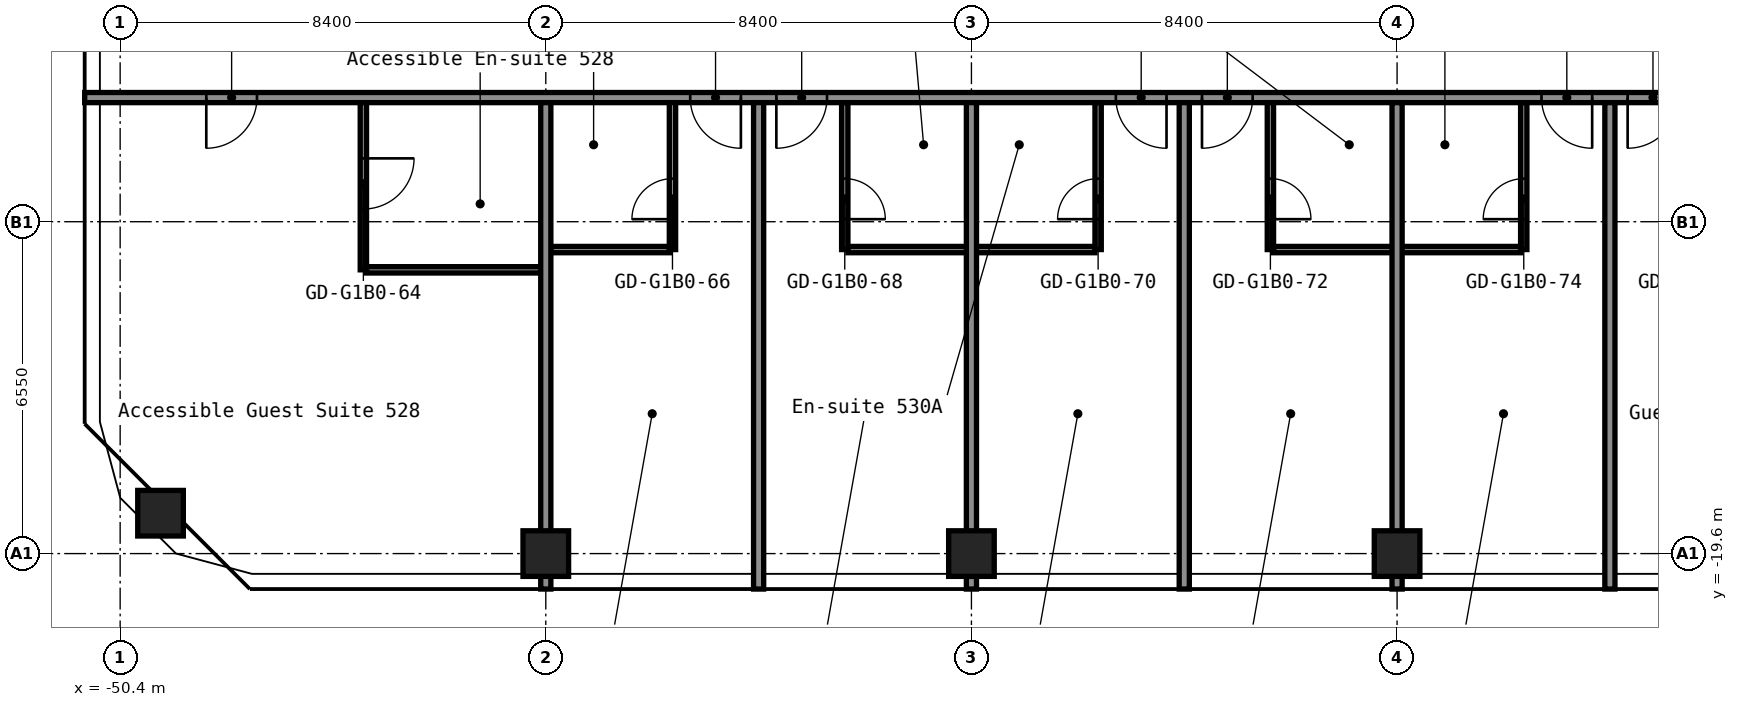
"""IFC4 building model, lengths in metres.
Left out: names, types, materials, properties, quantities, classifications, styles, units other than length and angle.
Written with IfcOpenShell. Run it as: python <this file> out.ifc"""

import sys

from ifc_helpers import new_model, si_unit, direction, frame, frame_2d, origin, origin_2d, place, context, subcontext, project, spatial, rectangle, hollow_rectangle, extrude, element, fill, save


model = new_model("IFC4")
c1 = context("Model", 3, precision=1e-05, world=origin(), true_north=direction((0.0, 1.0)))
c2 = subcontext(c1, "Body", "Model", "MODEL_VIEW")
j1 = project(units=[si_unit("LENGTHUNIT", "METRE"), si_unit("PLANEANGLEUNIT", "RADIAN")], contexts=[c1])
p1 = place(None, origin())
s1 = spatial("IfcSite", under=j1, at=p1, CompositionType="ELEMENT")
p2 = place(p1, origin())
s2 = spatial("IfcBuilding", under=s1, at=p2, CompositionType="ELEMENT")
p3 = place(p2, frame((0.0, 0.0, 23.0)))
s3 = spatial("IfcBuildingStorey", under=s2, at=p3, CompositionType="ELEMENT", Elevation=23.0)
for number, where, z_axis, x_axis in (
    (1, (-49.603, -18.803, 0.0), (0.0, 0.0, 1.0), (1.0, 0.0, 0.0)),
    (2, (-42.0, -19.6, 0.0), (0.0, 0.0, 1.0), (1.0, 0.0, 0.0)),
    (3, (-33.6, -19.6, 0.0), (0.0, 0.0, 1.0), (1.0, 0.0, 0.0)),
    (4, (-25.2, -19.6, 0.0), (0.0, 0.0, 1.0), (1.0, 0.0, 0.0)),
):
    element("IfcColumn", number, at=place(p3, frame(where, z_axis=z_axis, x_axis=x_axis)), inside=s3, PredefinedType="COLUMN", context=c2, shape_type="SweptSolid", body=[
        extrude(hollow_rectangle(XDim=0.9, YDim=0.9, WallThickness=0.036, at=origin_2d()), origin(), (0.0, 0.0, 1.0), 2.8),
    ])
p4 = place(p3, frame((-45.538, -14.0, 0.0), z_axis=(0.0, 0.0, 1.0), x_axis=(1.0, 0.0, 0.0)))
e5 = element("IfcWall", 5, at=p4, inside=s3, PredefinedType="PARTITIONING", context=c2, shape_type="SweptSolid", body=[
    extrude(rectangle(XDim=3.438, YDim=0.125, at=frame_2d((1.719, 0.0))), origin(), (0.0, 0.0, 1.0), 2.8),
])
p5 = place(p3, frame((-41.9, -13.6, 0.0), z_axis=(0.0, 0.0, 1.0), x_axis=(1.0, 0.0, 0.0)))
e6 = element("IfcWall", 6, at=p5, inside=s3, PredefinedType="PARTITIONING", context=c2, shape_type="SweptSolid", body=[
    extrude(rectangle(XDim=2.337, YDim=0.125, at=frame_2d((1.169, 0.0))), origin(), (0.0, 0.0, 1.0), 2.8),
])
for number, where, z_axis, x_axis in (
    (7, (-36.038, -13.6, 0.0), (0.0, 0.0, 1.0), (1.0, 0.0, 0.0)),
    (8, (-27.637, -13.6, 0.0), (0.0, 0.0, 1.0), (1.0, 0.0, 0.0)),
):
    element("IfcWall", number, at=place(p3, frame(where, z_axis=z_axis, x_axis=x_axis)), inside=s3, PredefinedType="PARTITIONING", context=c2, shape_type="SweptSolid", body=[
        extrude(rectangle(XDim=4.875, YDim=0.125, at=frame_2d((2.438, 0.0))), origin(), (0.0, 0.0, 1.0), 2.8),
    ])
p6 = place(p3, frame((-51.1, -10.6, 0.0), z_axis=(0.0, 0.0, 1.0), x_axis=(1.0, 0.0, 0.0)))
e9 = element("IfcWall", 9, at=p6, inside=s3, PredefinedType="PARTITIONING", context=c2, shape_type="SweptSolid", body=[
    extrude(rectangle(XDim=34.3, YDim=0.2, at=frame_2d((17.15, 0.0))), origin(), (0.0, 0.0, 1.0), 2.8),
])
p7 = place(p6, frame((2.4, 0.0, 0.0)))
e10 = element("IfcOpeningElement", 10, at=p7, cuts=e9, PredefinedType="OPENING", context=c2, shape_type="SweptSolid", body=[
    extrude(rectangle(XDim=1.0, YDim=2.1, at=frame_2d((0.5, 1.05))), frame((0.0, 0.11, 0.0), z_axis=(0.0, -1.0, 0.0), x_axis=(1.0, 0.0, 0.0)), (0.0, 0.0, 1.0), 0.22),
])
p8 = place(p6, frame((11.95, 0.0, 0.0)))
e11 = element("IfcOpeningElement", 11, at=p8, cuts=e9, PredefinedType="OPENING", context=c2, shape_type="SweptSolid", body=[
    extrude(rectangle(XDim=1.0, YDim=2.1, at=frame_2d((0.5, 1.05))), frame((0.0, 0.11, 0.0), z_axis=(0.0, -1.0, 0.0), x_axis=(1.0, 0.0, 0.0)), (0.0, 0.0, 1.0), 0.22),
])
p9 = place(p6, frame((13.65, 0.0, 0.0)))
e12 = element("IfcOpeningElement", 12, at=p9, cuts=e9, PredefinedType="OPENING", context=c2, shape_type="SweptSolid", body=[
    extrude(rectangle(XDim=1.0, YDim=2.1, at=frame_2d((0.5, 1.05))), frame((0.0, 0.11, 0.0), z_axis=(0.0, -1.0, 0.0), x_axis=(1.0, 0.0, 0.0)), (0.0, 0.0, 1.0), 0.22),
])
p10 = place(p6, frame((20.35, 0.0, 0.0)))
e13 = element("IfcOpeningElement", 13, at=p10, cuts=e9, PredefinedType="OPENING", context=c2, shape_type="SweptSolid", body=[
    extrude(rectangle(XDim=1.0, YDim=2.1, at=frame_2d((0.5, 1.05))), frame((0.0, 0.11, 0.0), z_axis=(0.0, -1.0, 0.0), x_axis=(1.0, 0.0, 0.0)), (0.0, 0.0, 1.0), 0.22),
])
p11 = place(p6, frame((22.05, 0.0, 0.0)))
e14 = element("IfcOpeningElement", 14, at=p11, cuts=e9, PredefinedType="OPENING", context=c2, shape_type="SweptSolid", body=[
    extrude(rectangle(XDim=1.0, YDim=2.1, at=frame_2d((0.5, 1.05))), frame((0.0, 0.11, 0.0), z_axis=(0.0, -1.0, 0.0), x_axis=(1.0, 0.0, 0.0)), (0.0, 0.0, 1.0), 0.22),
])
p12 = place(p6, frame((28.75, 0.0, 0.0)))
e15 = element("IfcOpeningElement", 15, at=p12, cuts=e9, PredefinedType="OPENING", context=c2, shape_type="SweptSolid", body=[
    extrude(rectangle(XDim=1.0, YDim=2.1, at=frame_2d((0.5, 1.05))), frame((0.0, 0.11, 0.0), z_axis=(0.0, -1.0, 0.0), x_axis=(1.0, 0.0, 0.0)), (0.0, 0.0, 1.0), 0.22),
])
p13 = place(p6, frame((30.45, 0.0, 0.0)))
e16 = element("IfcOpeningElement", 16, at=p13, cuts=e9, PredefinedType="OPENING", context=c2, shape_type="SweptSolid", body=[
    extrude(rectangle(XDim=1.0, YDim=2.1, at=frame_2d((0.5, 1.05))), frame((0.0, 0.11, 0.0), z_axis=(0.0, -1.0, 0.0), x_axis=(1.0, 0.0, 0.0)), (0.0, 0.0, 1.0), 0.22),
])
p14 = place(p3, frame((-45.6, -14.0, 0.0), z_axis=(0.0, 0.0, 1.0), x_axis=(0.0, 1.0, 0.0)))
e17 = element("IfcWall", 17, at=p14, inside=s3, PredefinedType="PARTITIONING", context=c2, shape_type="SweptSolid", body=[
    extrude(rectangle(XDim=3.3, YDim=0.125, at=frame_2d((1.65, 0.0))), origin(), (0.0, 0.0, 1.0), 2.8),
])
p15 = place(p14, frame((1.2, 0.0, 0.0)))
e18 = element("IfcOpeningElement", 18, at=p15, cuts=e17, PredefinedType="OPENING", context=c2, shape_type="SweptSolid", body=[
    extrude(rectangle(XDim=1.0, YDim=2.1, at=frame_2d((0.5, 1.05))), frame((0.0, 0.073, 0.0), z_axis=(0.0, -1.0, 0.0), x_axis=(1.0, 0.0, 0.0)), (0.0, 0.0, 1.0), 0.145),
])
p16 = place(p3, frame((-42.0, -20.3, 0.0), z_axis=(0.0, 0.0, 1.0), x_axis=(0.0, 1.0, 0.0)))
e19 = element("IfcWall", 19, at=p16, inside=s3, PredefinedType="PARTITIONING", context=c2, shape_type="SweptSolid", body=[
    extrude(rectangle(XDim=9.6, YDim=0.2, at=frame_2d((4.8, 0.0))), origin(), (0.0, 0.0, 1.0), 2.8),
])
p17 = place(p3, frame((-39.5, -13.6, 0.0), z_axis=(0.0, 0.0, 1.0), x_axis=(0.0, 1.0, 0.0)))
e20 = element("IfcWall", 20, at=p17, inside=s3, PredefinedType="PARTITIONING", context=c2, shape_type="SweptSolid", body=[
    extrude(rectangle(XDim=2.9, YDim=0.125, at=frame_2d((1.45, 0.0))), origin(), (0.0, 0.0, 1.0), 2.8),
])
p18 = place(p17, frame((0.6, 0.0, 0.0)))
e21 = element("IfcOpeningElement", 21, at=p18, cuts=e20, PredefinedType="OPENING", context=c2, shape_type="SweptSolid", body=[
    extrude(rectangle(XDim=0.8, YDim=2.1, at=frame_2d((0.4, 1.05))), frame((0.0, 0.073, 0.0), z_axis=(0.0, -1.0, 0.0), x_axis=(1.0, 0.0, 0.0)), (0.0, 0.0, 1.0), 0.145),
])
p19 = place(p3, frame((-37.8, -20.3, 0.0), z_axis=(0.0, 0.0, 1.0), x_axis=(0.0, 1.0, 0.0)))
e22 = element("IfcWall", 22, at=p19, inside=s3, PredefinedType="PARTITIONING", context=c2, shape_type="SweptSolid", body=[
    extrude(rectangle(XDim=9.6, YDim=0.2, at=frame_2d((4.8, 0.0))), origin(), (0.0, 0.0, 1.0), 2.8),
])
p20 = place(p3, frame((-36.1, -13.6, 0.0), z_axis=(0.0, 0.0, 1.0), x_axis=(0.0, 1.0, 0.0)))
e23 = element("IfcWall", 23, at=p20, inside=s3, PredefinedType="PARTITIONING", context=c2, shape_type="SweptSolid", body=[
    extrude(rectangle(XDim=2.9, YDim=0.125, at=frame_2d((1.45, 0.0))), origin(), (0.0, 0.0, 1.0), 2.8),
])
p21 = place(p20, frame((0.6, 0.0, 0.0)))
e24 = element("IfcOpeningElement", 24, at=p21, cuts=e23, PredefinedType="OPENING", context=c2, shape_type="SweptSolid", body=[
    extrude(rectangle(XDim=0.8, YDim=2.1, at=frame_2d((0.4, 1.05))), frame((0.0, 0.073, 0.0), z_axis=(0.0, -1.0, 0.0), x_axis=(1.0, 0.0, 0.0)), (0.0, 0.0, 1.0), 0.145),
])
p22 = place(p3, frame((-33.6, -20.3, 0.0), z_axis=(0.0, 0.0, 1.0), x_axis=(0.0, 1.0, 0.0)))
e25 = element("IfcWall", 25, at=p22, inside=s3, PredefinedType="PARTITIONING", context=c2, shape_type="SweptSolid", body=[
    extrude(rectangle(XDim=9.6, YDim=0.2, at=frame_2d((4.8, 0.0))), origin(), (0.0, 0.0, 1.0), 2.8),
])
p23 = place(p3, frame((-31.1, -13.6, 0.0), z_axis=(0.0, 0.0, 1.0), x_axis=(0.0, 1.0, 0.0)))
e26 = element("IfcWall", 26, at=p23, inside=s3, PredefinedType="PARTITIONING", context=c2, shape_type="SweptSolid", body=[
    extrude(rectangle(XDim=2.9, YDim=0.125, at=frame_2d((1.45, 0.0))), origin(), (0.0, 0.0, 1.0), 2.8),
])
p24 = place(p23, frame((0.6, 0.0, 0.0)))
e27 = element("IfcOpeningElement", 27, at=p24, cuts=e26, PredefinedType="OPENING", context=c2, shape_type="SweptSolid", body=[
    extrude(rectangle(XDim=0.8, YDim=2.1, at=frame_2d((0.4, 1.05))), frame((0.0, 0.073, 0.0), z_axis=(0.0, -1.0, 0.0), x_axis=(1.0, 0.0, 0.0)), (0.0, 0.0, 1.0), 0.145),
])
p25 = place(p3, frame((-29.4, -20.3, 0.0), z_axis=(0.0, 0.0, 1.0), x_axis=(0.0, 1.0, 0.0)))
e28 = element("IfcWall", 28, at=p25, inside=s3, PredefinedType="PARTITIONING", context=c2, shape_type="SweptSolid", body=[
    extrude(rectangle(XDim=9.6, YDim=0.2, at=frame_2d((4.8, 0.0))), origin(), (0.0, 0.0, 1.0), 2.8),
])
p26 = place(p3, frame((-27.7, -13.6, 0.0), z_axis=(0.0, 0.0, 1.0), x_axis=(0.0, 1.0, 0.0)))
e29 = element("IfcWall", 29, at=p26, inside=s3, PredefinedType="PARTITIONING", context=c2, shape_type="SweptSolid", body=[
    extrude(rectangle(XDim=2.9, YDim=0.125, at=frame_2d((1.45, 0.0))), origin(), (0.0, 0.0, 1.0), 2.8),
])
p27 = place(p26, frame((0.6, 0.0, 0.0)))
e30 = element("IfcOpeningElement", 30, at=p27, cuts=e29, PredefinedType="OPENING", context=c2, shape_type="SweptSolid", body=[
    extrude(rectangle(XDim=0.8, YDim=2.1, at=frame_2d((0.4, 1.05))), frame((0.0, 0.073, 0.0), z_axis=(0.0, -1.0, 0.0), x_axis=(1.0, 0.0, 0.0)), (0.0, 0.0, 1.0), 0.145),
])
p28 = place(p3, frame((-25.2, -20.3, 0.0), z_axis=(0.0, 0.0, 1.0), x_axis=(0.0, 1.0, 0.0)))
e31 = element("IfcWall", 31, at=p28, inside=s3, PredefinedType="PARTITIONING", context=c2, shape_type="SweptSolid", body=[
    extrude(rectangle(XDim=9.6, YDim=0.2, at=frame_2d((4.8, 0.0))), origin(), (0.0, 0.0, 1.0), 2.8),
])
p29 = place(p3, frame((-22.7, -13.6, 0.0), z_axis=(0.0, 0.0, 1.0), x_axis=(0.0, 1.0, 0.0)))
e32 = element("IfcWall", 32, at=p29, inside=s3, PredefinedType="PARTITIONING", context=c2, shape_type="SweptSolid", body=[
    extrude(rectangle(XDim=2.9, YDim=0.125, at=frame_2d((1.45, 0.0))), origin(), (0.0, 0.0, 1.0), 2.8),
])
p30 = place(p29, frame((0.6, 0.0, 0.0)))
e33 = element("IfcOpeningElement", 33, at=p30, cuts=e32, PredefinedType="OPENING", context=c2, shape_type="SweptSolid", body=[
    extrude(rectangle(XDim=0.8, YDim=2.1, at=frame_2d((0.4, 1.05))), frame((0.0, 0.073, 0.0), z_axis=(0.0, -1.0, 0.0), x_axis=(1.0, 0.0, 0.0)), (0.0, 0.0, 1.0), 0.145),
])
p31 = place(p3, frame((-21.0, -20.3, 0.0), z_axis=(0.0, 0.0, 1.0), x_axis=(0.0, 1.0, 0.0)))
e34 = element("IfcWall", 34, at=p31, inside=s3, PredefinedType="PARTITIONING", context=c2, shape_type="SweptSolid", body=[
    extrude(rectangle(XDim=9.6, YDim=0.2, at=frame_2d((4.8, 0.0))), origin(), (0.0, 0.0, 1.0), 2.8),
])
p32 = place(p7, origin())
e35 = element("IfcDoor", 35, at=p32, inside=s3, OperationType="SINGLE_SWING_LEFT", PredefinedType="DOOR", context=c2, shape_type="SweptSolid", body=[
    extrude(rectangle(XDim=1.0, YDim=2.1, at=frame_2d((0.5, 1.05))), frame((0.0, 0.025, 0.0), z_axis=(0.0, -1.0, 0.0), x_axis=(1.0, 0.0, 0.0)), (0.0, 0.0, 1.0), 0.05),
])
fill(e10, e35)
p33 = place(p8, origin())
e36 = element("IfcDoor", 36, at=p33, inside=s3, OperationType="SINGLE_SWING_RIGHT", PredefinedType="DOOR", context=c2, shape_type="SweptSolid", body=[
    extrude(rectangle(XDim=1.0, YDim=2.1, at=frame_2d((0.5, 1.05))), frame((0.0, 0.025, 0.0), z_axis=(0.0, -1.0, 0.0), x_axis=(1.0, 0.0, 0.0)), (0.0, 0.0, 1.0), 0.05),
])
fill(e11, e36)
p34 = place(p9, origin())
e37 = element("IfcDoor", 37, at=p34, inside=s3, OperationType="SINGLE_SWING_LEFT", PredefinedType="DOOR", context=c2, shape_type="SweptSolid", body=[
    extrude(rectangle(XDim=1.0, YDim=2.1, at=frame_2d((0.5, 1.05))), frame((0.0, 0.025, 0.0), z_axis=(0.0, -1.0, 0.0), x_axis=(1.0, 0.0, 0.0)), (0.0, 0.0, 1.0), 0.05),
])
fill(e12, e37)
p35 = place(p10, origin())
e38 = element("IfcDoor", 38, at=p35, inside=s3, OperationType="SINGLE_SWING_RIGHT", PredefinedType="DOOR", context=c2, shape_type="SweptSolid", body=[
    extrude(rectangle(XDim=1.0, YDim=2.1, at=frame_2d((0.5, 1.05))), frame((0.0, 0.025, 0.0), z_axis=(0.0, -1.0, 0.0), x_axis=(1.0, 0.0, 0.0)), (0.0, 0.0, 1.0), 0.05),
])
fill(e13, e38)
p36 = place(p11, origin())
e39 = element("IfcDoor", 39, at=p36, inside=s3, OperationType="SINGLE_SWING_LEFT", PredefinedType="DOOR", context=c2, shape_type="SweptSolid", body=[
    extrude(rectangle(XDim=1.0, YDim=2.1, at=frame_2d((0.5, 1.05))), frame((0.0, 0.025, 0.0), z_axis=(0.0, -1.0, 0.0), x_axis=(1.0, 0.0, 0.0)), (0.0, 0.0, 1.0), 0.05),
])
fill(e14, e39)
p37 = place(p12, origin())
e40 = element("IfcDoor", 40, at=p37, inside=s3, OperationType="SINGLE_SWING_RIGHT", PredefinedType="DOOR", context=c2, shape_type="SweptSolid", body=[
    extrude(rectangle(XDim=1.0, YDim=2.1, at=frame_2d((0.5, 1.05))), frame((0.0, 0.025, 0.0), z_axis=(0.0, -1.0, 0.0), x_axis=(1.0, 0.0, 0.0)), (0.0, 0.0, 1.0), 0.05),
])
fill(e15, e40)
p38 = place(p13, origin())
e41 = element("IfcDoor", 41, at=p38, inside=s3, OperationType="SINGLE_SWING_LEFT", PredefinedType="DOOR", context=c2, shape_type="SweptSolid", body=[
    extrude(rectangle(XDim=1.0, YDim=2.1, at=frame_2d((0.5, 1.05))), frame((0.0, 0.025, 0.0), z_axis=(0.0, -1.0, 0.0), x_axis=(1.0, 0.0, 0.0)), (0.0, 0.0, 1.0), 0.05),
])
fill(e16, e41)
p39 = place(p15, origin())
e42 = element("IfcDoor", 42, at=p39, inside=s3, OperationType="SINGLE_SWING_RIGHT", PredefinedType="DOOR", context=c2, shape_type="SweptSolid", body=[
    extrude(rectangle(XDim=1.0, YDim=2.1, at=frame_2d((0.5, 1.05))), frame((0.0, 0.025, 0.0), z_axis=(0.0, -1.0, 0.0), x_axis=(1.0, 0.0, 0.0)), (0.0, 0.0, 1.0), 0.05),
])
fill(e18, e42)
p40 = place(p18, origin())
e43 = element("IfcDoor", 43, at=p40, inside=s3, OperationType="SINGLE_SWING_RIGHT", PredefinedType="DOOR", context=c2, shape_type="SweptSolid", body=[
    extrude(rectangle(XDim=0.8, YDim=2.1, at=frame_2d((0.4, 1.05))), frame((0.0, 0.025, 0.0), z_axis=(0.0, -1.0, 0.0), x_axis=(1.0, 0.0, 0.0)), (0.0, 0.0, 1.0), 0.05),
])
fill(e21, e43)
p41 = place(p21, origin())
e44 = element("IfcDoor", 44, at=p41, inside=s3, OperationType="SINGLE_SWING_LEFT", PredefinedType="DOOR", context=c2, shape_type="SweptSolid", body=[
    extrude(rectangle(XDim=0.8, YDim=2.1, at=frame_2d((0.4, 1.05))), frame((0.0, 0.025, 0.0), z_axis=(0.0, -1.0, 0.0), x_axis=(1.0, 0.0, 0.0)), (0.0, 0.0, 1.0), 0.05),
])
fill(e24, e44)
p42 = place(p24, origin())
e45 = element("IfcDoor", 45, at=p42, inside=s3, OperationType="SINGLE_SWING_RIGHT", PredefinedType="DOOR", context=c2, shape_type="SweptSolid", body=[
    extrude(rectangle(XDim=0.8, YDim=2.1, at=frame_2d((0.4, 1.05))), frame((0.0, 0.025, 0.0), z_axis=(0.0, -1.0, 0.0), x_axis=(1.0, 0.0, 0.0)), (0.0, 0.0, 1.0), 0.05),
])
fill(e27, e45)
p43 = place(p27, origin())
e46 = element("IfcDoor", 46, at=p43, inside=s3, OperationType="SINGLE_SWING_LEFT", PredefinedType="DOOR", context=c2, shape_type="SweptSolid", body=[
    extrude(rectangle(XDim=0.8, YDim=2.1, at=frame_2d((0.4, 1.05))), frame((0.0, 0.025, 0.0), z_axis=(0.0, -1.0, 0.0), x_axis=(1.0, 0.0, 0.0)), (0.0, 0.0, 1.0), 0.05),
])
fill(e30, e46)
p44 = place(p30, origin())
e47 = element("IfcDoor", 47, at=p44, inside=s3, OperationType="SINGLE_SWING_RIGHT", PredefinedType="DOOR", context=c2, shape_type="SweptSolid", body=[
    extrude(rectangle(XDim=0.8, YDim=2.1, at=frame_2d((0.4, 1.05))), frame((0.0, 0.025, 0.0), z_axis=(0.0, -1.0, 0.0), x_axis=(1.0, 0.0, 0.0)), (0.0, 0.0, 1.0), 0.05),
])
fill(e33, e47)
save(model, sys.argv[1])
